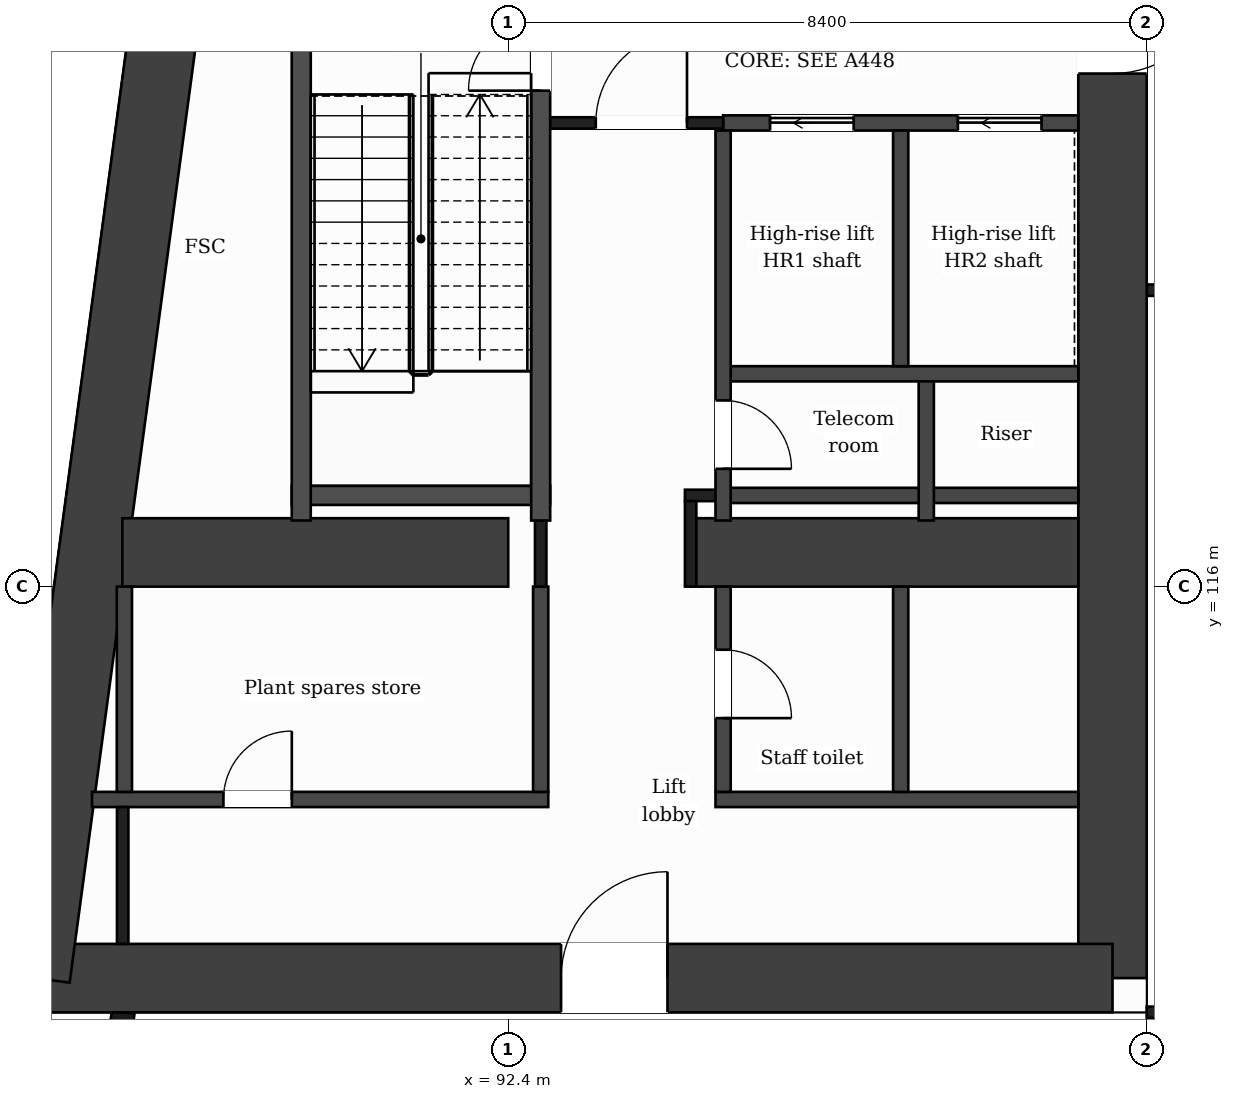
"""IFC4 building model, lengths in metres.
Left out: names, types, materials, properties, quantities, classifications, styles, units other than length and angle.
Written with IfcOpenShell. Run it as: python <this file> out.ifc"""

import sys

from ifc_helpers import new_model, si_unit, direction, frame, frame_2d, origin, place, context, subcontext, project, spatial, rectangle, extrude, element, fill, save


model = new_model("IFC4")
c1 = context("Model", 3, precision=1e-05, world=origin(), true_north=direction((0.0, 1.0)))
c2 = subcontext(c1, "Body", "Model", "MODEL_VIEW")
j1 = project(units=[si_unit("LENGTHUNIT", "METRE"), si_unit("PLANEANGLEUNIT", "RADIAN")], contexts=[c1])
p1 = place(None, origin())
s1 = spatial("IfcSite", under=j1, at=p1, CompositionType="ELEMENT")
p2 = place(p1, origin())
s2 = spatial("IfcBuilding", under=s1, at=p2, CompositionType="ELEMENT")
p3 = place(p2, frame((0.0, 0.0, 197.2)))
s3 = spatial("IfcBuildingStorey", under=s2, at=p3, CompositionType="ELEMENT", Elevation=197.2)
p4 = place(p3, frame((100.35, 131.95, 0.0), z_axis=(0.0, 0.0, 1.0), x_axis=(0.0, -1.0, 0.0)))
e1 = element("IfcWall", 1, at=p4, inside=s3, PredefinedType="SHEAR", context=c2, shape_type="SweptSolid", body=[
    extrude(rectangle(XDim=21.1, YDim=0.9, at=frame_2d((10.55, 0.0))), origin(), (0.0, 0.0, 1.0), 5.0),
])
p5 = place(p4, frame((2.35, 0.0, 0.0)))
e2 = element("IfcOpeningElement", 2, at=p5, cuts=e1, PredefinedType="OPENING", context=c2, shape_type="SweptSolid", body=[
    extrude(rectangle(XDim=1.2, YDim=2.1, at=frame_2d((0.6, 1.05))), frame((0.0, 0.46, 0.0), z_axis=(0.0, -1.0, 0.0), x_axis=(1.0, 0.0, 0.0)), (0.0, 0.0, 1.0), 0.92),
])
p6 = place(p4, frame((7.8, 0.0, 0.0)))
e3 = element("IfcOpeningElement", 3, at=p6, cuts=e1, PredefinedType="OPENING", context=c2, shape_type="SweptSolid", body=[
    extrude(rectangle(XDim=1.4, YDim=2.1, at=frame_2d((0.7, 1.05))), frame((0.0, 0.46, 0.0), z_axis=(0.0, -1.0, 0.0), x_axis=(1.0, 0.0, 0.0)), (0.0, 0.0, 1.0), 0.92),
])
p7 = place(p3, frame((100.35, 110.85, 0.0), z_axis=(0.0, 0.0, 1.0), x_axis=(-1.0, 0.0, 0.0)))
e4 = element("IfcWall", 4, at=p7, inside=s3, PredefinedType="SHEAR", context=c2, shape_type="SweptSolid", body=[
    extrude(rectangle(XDim=14.166, YDim=0.9, at=frame_2d((7.083, 0.0))), origin(), (0.0, 0.0, 1.0), 5.0),
])
p8 = place(p7, frame((5.855, 0.0, 0.0)))
e5 = element("IfcOpeningElement", 5, at=p8, cuts=e4, PredefinedType="OPENING", context=c2, shape_type="SweptSolid", body=[
    extrude(rectangle(XDim=1.4, YDim=2.1, at=frame_2d((0.7, 1.05))), frame((0.0, 0.46, 0.0), z_axis=(0.0, -1.0, 0.0), x_axis=(1.0, 0.0, 0.0)), (0.0, 0.0, 1.0), 0.92),
])
p9 = place(p3, frame((86.184, 110.85, 0.0), z_axis=(0.0, 0.0, 1.0), x_axis=(0.133410495943, 0.991060865725, 0.0)))
e6 = element("IfcWall", 6, at=p9, inside=s3, PredefinedType="SHEAR", context=c2, shape_type="SweptSolid", body=[
    extrude(rectangle(XDim=21.29, YDim=0.9, at=frame_2d((10.645, 0.0))), origin(), (0.0, 0.0, 1.0), 5.0),
])
p10 = place(p3, frame((87.323, 116.45, 0.0), z_axis=(0.0, 0.0, 1.0), x_axis=(1.0, 0.0, 0.0)))
e7 = element("IfcWall", 7, at=p10, inside=s3, PredefinedType="SHEAR", context=c2, shape_type="SweptSolid", body=[
    extrude(rectangle(XDim=5.077, YDim=0.9, at=frame_2d((2.539, 0.0))), origin(), (0.0, 0.0, 1.0), 5.0),
])
p11 = place(p3, frame((94.8, 116.45, 0.0), z_axis=(0.0, 0.0, 1.0), x_axis=(1.0, 0.0, 0.0)))
e8 = element("IfcWall", 8, at=p11, inside=s3, PredefinedType="SHEAR", context=c2, shape_type="SweptSolid", body=[
    extrude(rectangle(XDim=5.1, YDim=0.9, at=frame_2d((2.55, 0.0))), origin(), (0.0, 0.0, 1.0), 5.0),
])
p12 = place(p3, frame((87.334, 110.4, 0.0), z_axis=(0.0, 0.0, 1.0), x_axis=(-0.133437175554, -0.991057273915, 0.0)))
e9 = element("IfcWall", 9, at=p12, inside=s3, PredefinedType="SOLIDWALL", context=c2, shape_type="SweptSolid", body=[
    extrude(rectangle(XDim=6.781, YDim=0.3, at=frame_2d((3.39, 0.0))), origin(), (0.0, 0.0, 1.0), 4.68),
])
p13 = place(p12, frame((1.418, 0.0, 0.0)))
e10 = element("IfcOpeningElement", 10, at=p13, cuts=e9, PredefinedType="OPENING", context=c2, shape_type="SweptSolid", body=[
    extrude(rectangle(XDim=1.2, YDim=2.4, at=frame_2d((0.6, 1.2))), frame((0.0, 0.16, 0.0), z_axis=(0.0, -1.0, 0.0), x_axis=(1.0, 0.0, 0.0)), (0.0, 0.0, 1.0), 0.32),
])
p14 = place(p3, frame((100.8, 110.4, 0.0), z_axis=(0.0, 0.0, 1.0), x_axis=(1.0, 0.0, 0.0)))
e11 = element("IfcWall", 11, at=p14, inside=s3, PredefinedType="PARTITIONING", context=c2, shape_type="SweptSolid", body=[
    extrude(rectangle(XDim=25.2, YDim=0.15, at=frame_2d((12.6, 0.0))), origin(), (0.0, 0.0, 1.0), 4.68),
])
p15 = place(p3, frame((86.924, 113.2, 0.0), z_axis=(0.0, 0.0, 1.0), x_axis=(1.0, 0.0, 0.0)))
e12 = element("IfcWall", 12, at=p15, inside=s3, PredefinedType="PARTITIONING", context=c2, shape_type="SweptSolid", body=[
    extrude(rectangle(XDim=6.003, YDim=0.2, at=frame_2d((3.001, 0.0))), origin(), (0.0, 0.0, 1.0), 4.68),
])
p16 = place(p15, frame((1.729, 0.0, 0.0)))
e13 = element("IfcOpeningElement", 13, at=p16, cuts=e12, PredefinedType="OPENING", context=c2, shape_type="SweptSolid", body=[
    extrude(rectangle(XDim=0.9, YDim=2.1, at=frame_2d((0.45, 1.05))), frame((0.0, 0.11, 0.0), z_axis=(0.0, -1.0, 0.0), x_axis=(1.0, 0.0, 0.0)), (0.0, 0.0, 1.0), 0.22),
])
p17 = place(p3, frame((95.127, 113.2, 0.0), z_axis=(0.0, 0.0, 1.0), x_axis=(1.0, 0.0, 0.0)))
e14 = element("IfcWall", 14, at=p17, inside=s3, PredefinedType="PARTITIONING", context=c2, shape_type="SweptSolid", body=[
    extrude(rectangle(XDim=4.773, YDim=0.2, at=frame_2d((2.386, 0.0))), origin(), (0.0, 0.0, 1.0), 4.68),
])
p18 = place(p3, frame((95.227, 117.2, 0.0), z_axis=(0.0, 0.0, 1.0), x_axis=(1.0, 0.0, 0.0)))
e15 = element("IfcWall", 15, at=p18, inside=s3, PredefinedType="PARTITIONING", context=c2, shape_type="SweptSolid", body=[
    extrude(rectangle(XDim=4.673, YDim=0.2, at=frame_2d((2.336, 0.0))), origin(), (0.0, 0.0, 1.0), 4.68),
])
p19 = place(p3, frame((94.725, 117.2, 0.0), z_axis=(0.0, 0.0, 1.0), x_axis=(1.0, 0.0, 0.0)))
e16 = element("IfcWall", 16, at=p19, inside=s3, PredefinedType="PARTITIONING", context=c2, shape_type="SweptSolid", body=[
    extrude(rectangle(XDim=0.502, YDim=0.15, at=frame_2d((0.251, 0.0))), origin(), (0.0, 0.0, 1.0), 4.68),
])
p20 = place(p3, frame((89.552, 117.2, 0.0), z_axis=(0.0, 0.0, 1.0), x_axis=(1.0, 0.0, 0.0)))
e17 = element("IfcWall", 17, at=p20, inside=s3, PredefinedType="PARTITIONING", context=c2, shape_type="SweptSolid", body=[
    extrude(rectangle(XDim=3.4, YDim=0.25, at=frame_2d((1.7, 0.0))), origin(), (0.0, 0.0, 1.0), 4.68),
])
p21 = place(p3, frame((95.227, 118.8, 0.0), z_axis=(0.0, 0.0, 1.0), x_axis=(1.0, 0.0, 0.0)))
e18 = element("IfcWall", 18, at=p21, inside=s3, PredefinedType="PARTITIONING", context=c2, shape_type="SweptSolid", body=[
    extrude(rectangle(XDim=4.673, YDim=0.2, at=frame_2d((2.336, 0.0))), origin(), (0.0, 0.0, 1.0), 4.68),
])
p22 = place(p3, frame((100.8, 119.9, 0.0), z_axis=(0.0, 0.0, 1.0), x_axis=(1.0, 0.0, 0.0)))
e19 = element("IfcWall", 19, at=p22, inside=s3, PredefinedType="PARTITIONING", context=c2, shape_type="SweptSolid", body=[
    extrude(rectangle(XDim=25.2, YDim=0.15, at=frame_2d((12.6, 0.0))), origin(), (0.0, 0.0, 1.0), 4.68),
])
p23 = place(p22, frame((3.6, 0.0, 0.0)))
e20 = element("IfcOpeningElement", 20, at=p23, cuts=e19, PredefinedType="OPENING", context=c2, shape_type="SweptSolid", body=[
    extrude(rectangle(XDim=1.2, YDim=2.1, at=frame_2d((0.6, 1.05))), frame((0.0, 0.085, 0.0), z_axis=(0.0, -1.0, 0.0), x_axis=(1.0, 0.0, 0.0)), (0.0, 0.0, 1.0), 0.17),
])
p24 = place(p22, frame((12.0, 0.0, 0.0)))
e21 = element("IfcOpeningElement", 21, at=p24, cuts=e19, PredefinedType="OPENING", context=c2, shape_type="SweptSolid", body=[
    extrude(rectangle(XDim=1.2, YDim=2.1, at=frame_2d((0.6, 1.05))), frame((0.0, 0.085, 0.0), z_axis=(0.0, -1.0, 0.0), x_axis=(1.0, 0.0, 0.0)), (0.0, 0.0, 1.0), 0.17),
])
p25 = place(p22, frame((20.4, 0.0, 0.0)))
e22 = element("IfcOpeningElement", 22, at=p25, cuts=e19, PredefinedType="OPENING", context=c2, shape_type="SweptSolid", body=[
    extrude(rectangle(XDim=1.2, YDim=2.1, at=frame_2d((0.6, 1.05))), frame((0.0, 0.085, 0.0), z_axis=(0.0, -1.0, 0.0), x_axis=(1.0, 0.0, 0.0)), (0.0, 0.0, 1.0), 0.17),
])
p26 = place(p3, frame((95.227, 122.1, 0.0), z_axis=(0.0, 0.0, 1.0), x_axis=(1.0, 0.0, 0.0)))
e23 = element("IfcWall", 23, at=p26, inside=s3, PredefinedType="PARTITIONING", context=c2, shape_type="SweptSolid", body=[
    extrude(rectangle(XDim=4.673, YDim=0.2, at=frame_2d((2.336, 0.0))), origin(), (0.0, 0.0, 1.0), 4.68),
])
p27 = place(p26, frame((0.618, 0.0, 0.0)))
e24 = element("IfcOpeningElement", 24, at=p27, cuts=e23, PredefinedType="OPENING", context=c2, shape_type="SweptSolid", body=[
    extrude(rectangle(XDim=1.1, YDim=2.1, at=frame_2d((0.55, 1.05))), frame((0.0, 0.11, 0.0), z_axis=(0.0, -1.0, 0.0), x_axis=(1.0, 0.0, 0.0)), (0.0, 0.0, 1.0), 0.22),
])
p28 = place(p26, frame((3.089, 0.0, 0.0)))
e25 = element("IfcOpeningElement", 25, at=p28, cuts=e23, PredefinedType="OPENING", context=c2, shape_type="SweptSolid", body=[
    extrude(rectangle(XDim=1.1, YDim=2.1, at=frame_2d((0.55, 1.05))), frame((0.0, 0.11, 0.0), z_axis=(0.0, -1.0, 0.0), x_axis=(1.0, 0.0, 0.0)), (0.0, 0.0, 1.0), 0.22),
])
p29 = place(p3, frame((92.827, 122.1, 0.0), z_axis=(0.0, 0.0, 1.0), x_axis=(1.0, 0.0, 0.0)))
e26 = element("IfcWall", 26, at=p29, inside=s3, PredefinedType="PARTITIONING", context=c2, shape_type="SweptSolid", body=[
    extrude(rectangle(XDim=2.4, YDim=0.15, at=frame_2d((1.2, 0.0))), origin(), (0.0, 0.0, 1.0), 4.68),
])
p30 = place(p29, frame((0.725, 0.0, 0.0)))
e27 = element("IfcOpeningElement", 27, at=p30, cuts=e26, PredefinedType="OPENING", context=c2, shape_type="SweptSolid", body=[
    extrude(rectangle(XDim=1.2, YDim=2.1, at=frame_2d((0.6, 1.05))), frame((0.0, 0.085, 0.0), z_axis=(0.0, -1.0, 0.0), x_axis=(1.0, 0.0, 0.0)), (0.0, 0.0, 1.0), 0.17),
])
p31 = place(p3, frame((87.35, 113.3, 0.0), z_axis=(0.0, 0.0, 1.0), x_axis=(0.0, 1.0, 0.0)))
e28 = element("IfcWall", 28, at=p31, inside=s3, PredefinedType="PARTITIONING", context=c2, shape_type="SweptSolid", body=[
    extrude(rectangle(XDim=2.7, YDim=0.2, at=frame_2d((1.35, 0.0))), origin(), (0.0, 0.0, 1.0), 4.68),
])
p32 = place(p3, frame((87.328, 111.3, 0.0), z_axis=(0.0, 0.0, 1.0), x_axis=(0.0, 1.0, 0.0)))
e29 = element("IfcWall", 29, at=p32, inside=s3, PredefinedType="PARTITIONING", context=c2, shape_type="SweptSolid", body=[
    extrude(rectangle(XDim=1.8, YDim=0.15, at=frame_2d((0.9, 0.0))), origin(), (0.0, 0.0, 1.0), 4.68),
])
p33 = place(p3, frame((89.677, 116.87, 0.0), z_axis=(0.0, 0.0, 1.0), x_axis=(0.0, 1.0, 0.0)))
e30 = element("IfcWall", 30, at=p33, inside=s3, PredefinedType="PARTITIONING", context=c2, shape_type="SweptSolid", body=[
    extrude(rectangle(XDim=6.955, YDim=0.25, at=frame_2d((3.478, 0.0))), origin(), (0.0, 0.0, 1.0), 4.68),
])
p34 = place(p3, frame((92.827, 113.3, 0.0), z_axis=(0.0, 0.0, 1.0), x_axis=(0.0, 1.0, 0.0)))
e31 = element("IfcWall", 31, at=p34, inside=s3, PredefinedType="PARTITIONING", context=c2, shape_type="SweptSolid", body=[
    extrude(rectangle(XDim=2.7, YDim=0.2, at=frame_2d((1.35, 0.0))), origin(), (0.0, 0.0, 1.0), 4.68),
])
p35 = place(p3, frame((92.827, 116.0, 0.0), z_axis=(0.0, 0.0, 1.0), x_axis=(0.0, 1.0, 0.0)))
e32 = element("IfcWall", 32, at=p35, inside=s3, PredefinedType="PARTITIONING", context=c2, shape_type="SweptSolid", body=[
    extrude(rectangle(XDim=0.87, YDim=0.15, at=frame_2d((0.435, 0.0))), origin(), (0.0, 0.0, 1.0), 4.68),
])
p36 = place(p3, frame((92.827, 116.87, 0.0), z_axis=(0.0, 0.0, 1.0), x_axis=(0.0, 1.0, 0.0)))
e33 = element("IfcWall", 33, at=p36, inside=s3, PredefinedType="PARTITIONING", context=c2, shape_type="SweptSolid", body=[
    extrude(rectangle(XDim=6.955, YDim=0.25, at=frame_2d((3.478, 0.0))), origin(), (0.0, 0.0, 1.0), 4.68),
])
p37 = place(p36, frame((5.655, 0.0, 0.0)))
e34 = element("IfcOpeningElement", 34, at=p37, cuts=e33, PredefinedType="OPENING", context=c2, shape_type="SweptSolid", body=[
    extrude(rectangle(XDim=0.95, YDim=2.1, at=frame_2d((0.475, 1.05))), frame((0.0, 0.135, 0.0), z_axis=(0.0, -1.0, 0.0), x_axis=(1.0, 0.0, 0.0)), (0.0, 0.0, 1.0), 0.27),
])
p38 = place(p3, frame((94.8, 116.0, 0.0), z_axis=(0.0, 0.0, 1.0), x_axis=(0.0, 1.0, 0.0)))
e35 = element("IfcWall", 35, at=p38, inside=s3, PredefinedType="PARTITIONING", context=c2, shape_type="SweptSolid", body=[
    extrude(rectangle(XDim=1.125, YDim=0.15, at=frame_2d((0.562, 0.0))), origin(), (0.0, 0.0, 1.0), 4.68),
])
p39 = place(p3, frame((95.227, 113.3, 0.0), z_axis=(0.0, 0.0, 1.0), x_axis=(0.0, 1.0, 0.0)))
e36 = element("IfcWall", 36, at=p39, inside=s3, PredefinedType="PARTITIONING", context=c2, shape_type="SweptSolid", body=[
    extrude(rectangle(XDim=2.7, YDim=0.2, at=frame_2d((1.35, 0.0))), origin(), (0.0, 0.0, 1.0), 4.68),
])
p40 = place(p39, frame((0.97, 0.0, 0.0)))
e37 = element("IfcOpeningElement", 37, at=p40, cuts=e36, PredefinedType="OPENING", context=c2, shape_type="SweptSolid", body=[
    extrude(rectangle(XDim=0.9, YDim=2.1, at=frame_2d((0.45, 1.05))), frame((0.0, 0.11, 0.0), z_axis=(0.0, -1.0, 0.0), x_axis=(1.0, 0.0, 0.0)), (0.0, 0.0, 1.0), 0.22),
])
p41 = place(p3, frame((95.227, 116.87, 0.0), z_axis=(0.0, 0.0, 1.0), x_axis=(0.0, 1.0, 0.0)))
e38 = element("IfcWall", 38, at=p41, inside=s3, PredefinedType="PARTITIONING", context=c2, shape_type="SweptSolid", body=[
    extrude(rectangle(XDim=5.13, YDim=0.2, at=frame_2d((2.565, 0.0))), origin(), (0.0, 0.0, 1.0), 4.68),
])
p42 = place(p41, frame((0.68, 0.0, 0.0)))
e39 = element("IfcOpeningElement", 39, at=p42, cuts=e38, PredefinedType="OPENING", context=c2, shape_type="SweptSolid", body=[
    extrude(rectangle(XDim=0.9, YDim=2.1, at=frame_2d((0.45, 1.05))), frame((0.0, 0.11, 0.0), z_axis=(0.0, -1.0, 0.0), x_axis=(1.0, 0.0, 0.0)), (0.0, 0.0, 1.0), 0.22),
])
p43 = place(p3, frame((97.563, 113.3, 0.0), z_axis=(0.0, 0.0, 1.0), x_axis=(0.0, 1.0, 0.0)))
e40 = element("IfcWall", 40, at=p43, inside=s3, PredefinedType="PARTITIONING", context=c2, shape_type="SweptSolid", body=[
    extrude(rectangle(XDim=2.7, YDim=0.2, at=frame_2d((1.35, 0.0))), origin(), (0.0, 0.0, 1.0), 4.68),
])
p44 = place(p3, frame((97.563, 118.9, 0.0), z_axis=(0.0, 0.0, 1.0), x_axis=(0.0, 1.0, 0.0)))
e41 = element("IfcWall", 41, at=p44, inside=s3, PredefinedType="PARTITIONING", context=c2, shape_type="SweptSolid", body=[
    extrude(rectangle(XDim=3.1, YDim=0.2, at=frame_2d((1.55, 0.0))), origin(), (0.0, 0.0, 1.0), 4.68),
])
p45 = place(p3, frame((97.9, 116.87, 0.0), z_axis=(0.0, 0.0, 1.0), x_axis=(0.0, 1.0, 0.0)))
e42 = element("IfcWall", 42, at=p45, inside=s3, PredefinedType="PARTITIONING", context=c2, shape_type="SweptSolid", body=[
    extrude(rectangle(XDim=1.83, YDim=0.2, at=frame_2d((0.915, 0.0))), origin(), (0.0, 0.0, 1.0), 4.68),
])
p46 = place(p30, origin())
e43 = element("IfcDoor", 43, at=p46, inside=s3, OperationType="SINGLE_SWING_RIGHT", PredefinedType="DOOR", context=c2, shape_type="SweptSolid", body=[
    extrude(rectangle(XDim=1.2, YDim=2.1, at=frame_2d((0.6, 1.05))), frame((0.0, 0.025, 0.0), z_axis=(0.0, -1.0, 0.0), x_axis=(1.0, 0.0, 0.0)), (0.0, 0.0, 1.0), 0.05),
])
fill(e27, e43)
p47 = place(p27, origin())
e44 = element("IfcDoor", 44, at=p47, inside=s3, OperationType="SLIDING_TO_LEFT", PredefinedType="DOOR", context=c2, shape_type="SweptSolid", body=[
    extrude(rectangle(XDim=1.1, YDim=2.1, at=frame_2d((0.55, 1.05))), frame((0.0, 0.025, 0.0), z_axis=(0.0, -1.0, 0.0), x_axis=(1.0, 0.0, 0.0)), (0.0, 0.0, 1.0), 0.05),
])
fill(e24, e44)
p48 = place(p28, origin())
e45 = element("IfcDoor", 45, at=p48, inside=s3, OperationType="SLIDING_TO_LEFT", PredefinedType="DOOR", context=c2, shape_type="SweptSolid", body=[
    extrude(rectangle(XDim=1.1, YDim=2.1, at=frame_2d((0.55, 1.05))), frame((0.0, 0.025, 0.0), z_axis=(0.0, -1.0, 0.0), x_axis=(1.0, 0.0, 0.0)), (0.0, 0.0, 1.0), 0.05),
])
fill(e25, e45)
p49 = place(p37, origin())
e46 = element("IfcDoor", 46, at=p49, inside=s3, OperationType="SINGLE_SWING_LEFT", PredefinedType="DOOR", context=c2, shape_type="SweptSolid", body=[
    extrude(rectangle(XDim=0.95, YDim=2.1, at=frame_2d((0.475, 1.05))), frame((0.0, 0.025, 0.0), z_axis=(0.0, -1.0, 0.0), x_axis=(1.0, 0.0, 0.0)), (0.0, 0.0, 1.0), 0.05),
])
fill(e34, e46)
p50 = place(p42, origin())
e47 = element("IfcDoor", 47, at=p50, inside=s3, OperationType="SINGLE_SWING_LEFT", PredefinedType="DOOR", context=c2, shape_type="SweptSolid", body=[
    extrude(rectangle(XDim=0.9, YDim=2.1, at=frame_2d((0.45, 1.05))), frame((0.0, 0.025, 0.0), z_axis=(0.0, -1.0, 0.0), x_axis=(1.0, 0.0, 0.0)), (0.0, 0.0, 1.0), 0.05),
])
fill(e39, e47)
p51 = place(p16, origin())
e48 = element("IfcDoor", 48, at=p51, inside=s3, OperationType="SINGLE_SWING_RIGHT", PredefinedType="DOOR", context=c2, shape_type="SweptSolid", body=[
    extrude(rectangle(XDim=0.9, YDim=2.1, at=frame_2d((0.45, 1.05))), frame((0.0, 0.025, 0.0), z_axis=(0.0, -1.0, 0.0), x_axis=(1.0, 0.0, 0.0)), (0.0, 0.0, 1.0), 0.05),
])
fill(e13, e48)
p52 = place(p40, origin())
e49 = element("IfcDoor", 49, at=p52, inside=s3, OperationType="SINGLE_SWING_LEFT", PredefinedType="DOOR", context=c2, shape_type="SweptSolid", body=[
    extrude(rectangle(XDim=0.9, YDim=2.1, at=frame_2d((0.45, 1.05))), frame((0.0, 0.025, 0.0), z_axis=(0.0, -1.0, 0.0), x_axis=(1.0, 0.0, 0.0)), (0.0, 0.0, 1.0), 0.05),
])
fill(e37, e49)
p53 = place(p8, origin())
e50 = element("IfcDoor", 50, at=p53, inside=s3, OperationType="SINGLE_SWING_LEFT", PredefinedType="DOOR", context=c2, shape_type="SweptSolid", body=[
    extrude(rectangle(XDim=1.4, YDim=2.1, at=frame_2d((0.7, 1.05))), frame((0.0, 0.025, 0.0), z_axis=(0.0, -1.0, 0.0), x_axis=(1.0, 0.0, 0.0)), (0.0, 0.0, 1.0), 0.05),
])
fill(e5, e50)
p54 = place(p6, origin())
e51 = element("IfcDoor", 51, at=p54, inside=s3, OperationType="SINGLE_SWING_LEFT", PredefinedType="DOOR", context=c2, shape_type="SweptSolid", body=[
    extrude(rectangle(XDim=1.4, YDim=2.1, at=frame_2d((0.7, 1.05))), frame((0.0, 0.025, 0.0), z_axis=(0.0, -1.0, 0.0), x_axis=(1.0, 0.0, 0.0)), (0.0, 0.0, 1.0), 0.05),
])
fill(e3, e51)
save(model, sys.argv[1])
